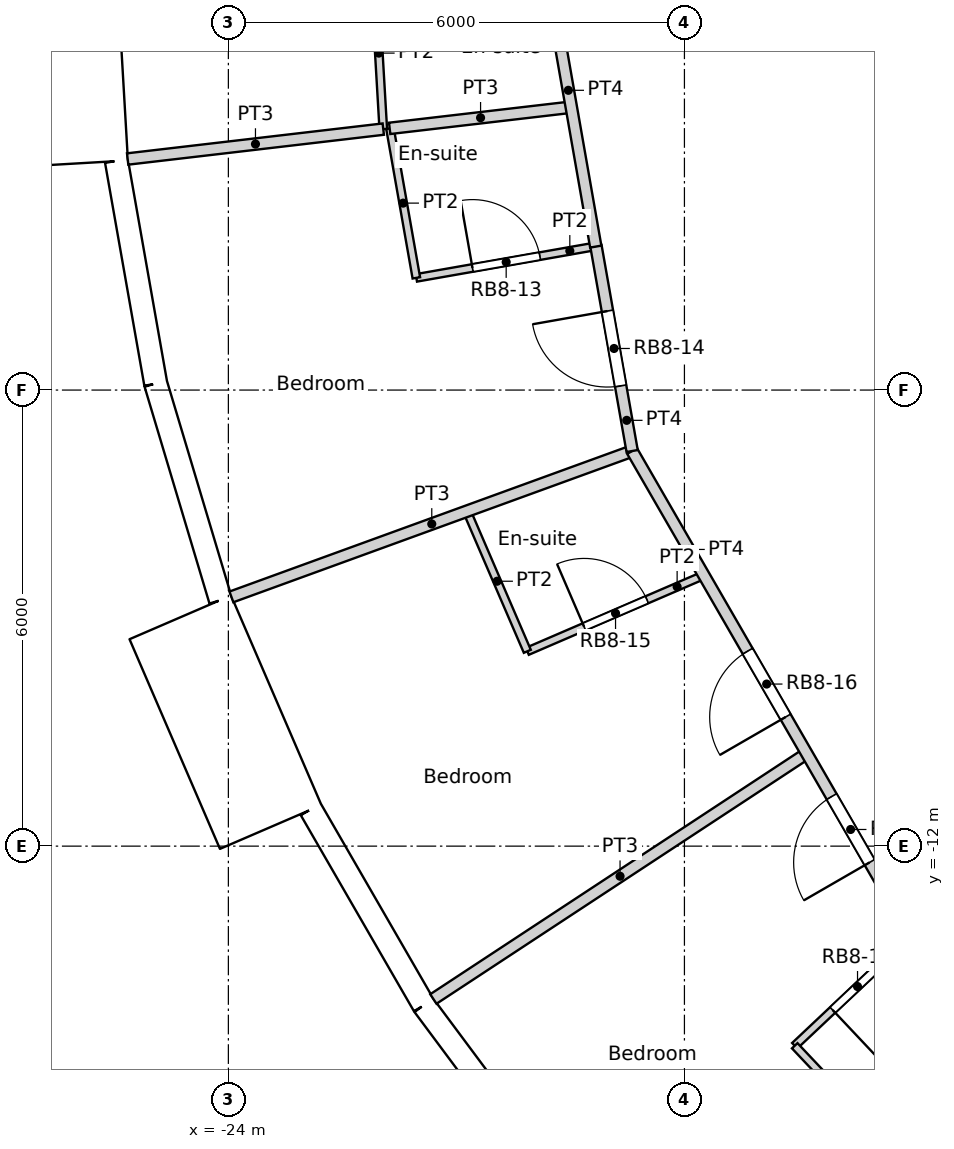
"""IFC4 building model, lengths in metres.
Left out: names, types, materials, properties, quantities, classifications, styles, units other than length and angle.
Written with IfcOpenShell. Run it as: python <this file> out.ifc"""

import sys

from ifc_helpers import new_model, si_unit, direction, frame, frame_2d, origin, origin_2d, place, context, subcontext, project, spatial, rectangle, circle, extrude, element, fill, save


model = new_model("IFC4")
c1 = context("Model", 3, precision=1e-05, world=origin(), true_north=direction((0.0, 1.0)))
c2 = subcontext(c1, "Body", "Model", "MODEL_VIEW")
j1 = project(units=[si_unit("LENGTHUNIT", "METRE"), si_unit("PLANEANGLEUNIT", "RADIAN")], contexts=[c1])
p1 = place(None, origin())
s1 = spatial("IfcSite", under=j1, at=p1, CompositionType="ELEMENT")
p2 = place(p1, origin())
s2 = spatial("IfcBuilding", under=s1, at=p2, CompositionType="ELEMENT")
p3 = place(p2, frame((0.0, 0.0, 201.6)))
s3 = spatial("IfcBuildingStorey", under=s2, at=p3, CompositionType="ELEMENT", Elevation=201.6)
for number, where, z_axis, x_axis in (
    (1, (-24.382, -2.85, 0.0), (0.0, 0.0, 1.0), (1.0, 0.0, 0.0)),
    (2, (-23.067, -8.396, 0.0), (0.0, 0.0, 1.0), (1.0, 0.0, 0.0)),
    (3, (-20.509, -13.489, 0.0), (0.0, 0.0, 1.0), (1.0, 0.0, 0.0)),
):
    element("IfcColumn", number, at=place(p3, frame(where, z_axis=z_axis, x_axis=x_axis)), inside=s3, PredefinedType="COLUMN", context=c2, shape_type="SweptSolid", body=[
        extrude(circle(Radius=0.6, at=origin_2d()), origin(), (0.0, 0.0, 1.0), 3.6),
    ])
for number, where, z_axis, x_axis in (
    (4, (-18.612, -2.805, 0.0), (0.0, 0.0, 1.0), (1.0, 0.0, 0.0)),
    (5, (-16.958, -8.167, 0.0), (0.0, 0.0, 1.0), (1.0, 0.0, 0.0)),
):
    element("IfcColumn", number, at=place(p3, frame(where, z_axis=z_axis, x_axis=x_axis)), inside=s3, PredefinedType="COLUMN", context=c2, shape_type="SweptSolid", body=[
        extrude(circle(Radius=0.65, at=origin_2d()), origin(), (0.0, 0.0, 1.0), 3.6),
    ])
p4 = place(p3, frame((-26.222, -0.025, -0.3), z_axis=(0.0, 0.0, 1.0), x_axis=(0.058106596105, -0.998310384344, 0.0)))
e6 = element("IfcWall", 6, at=p4, inside=s3, PredefinedType="ELEMENTEDWALL", context=c2, shape_type="SweptSolid", body=[
    extrude(rectangle(XDim=3.0, YDim=1.45, at=frame_2d((1.5, 0.0))), origin(), (0.0, 0.0, 1.0), 3.6),
])
p5 = place(p4, frame((1.5, 0.0, 1.85)))
e7 = element("IfcOpeningElement", 7, at=p5, cuts=e6, PredefinedType="OPENING", context=c2, shape_type="SweptSolid", body=[
    extrude(circle(Radius=0.9, at=origin_2d()), frame((0.0, 0.735, 0.0), z_axis=(0.0, -1.0, 0.0), x_axis=(1.0, 0.0, 0.0)), (0.0, 0.0, 1.0), 1.47),
])
p6 = place(p3, frame((-25.472, -2.987, 0.0), z_axis=(0.0, 0.0, 1.0), x_axis=(0.173686952598, -0.984800915159, 0.0)))
e8 = element("IfcWall", 8, at=p6, inside=s3, PredefinedType="SOLIDWALL", context=c2, shape_type="SweptSolid", body=[
    extrude(rectangle(XDim=2.973, YDim=0.3, at=frame_2d((1.486, 0.0))), origin(), (0.0, 0.0, 1.0), 3.3),
])
p7 = place(p6, frame((1.486, 0.0, 1.55)))
e9 = element("IfcOpeningElement", 9, at=p7, cuts=e8, PredefinedType="OPENING", context=c2, shape_type="SweptSolid", body=[
    extrude(circle(Radius=0.9, at=origin_2d()), frame((0.0, 0.16, 0.0), z_axis=(0.0, -1.0, 0.0), x_axis=(1.0, 0.0, 0.0)), (0.0, 0.0, 1.0), 0.32),
])
p8 = place(p3, frame((-24.956, -5.915, 0.0), z_axis=(0.0, 0.0, 1.0), x_axis=(0.286782750849, -0.957995643944, 0.0)))
e10 = element("IfcWall", 10, at=p8, inside=s3, PredefinedType="SOLIDWALL", context=c2, shape_type="SweptSolid", body=[
    extrude(rectangle(XDim=2.973, YDim=0.3, at=frame_2d((1.486, 0.0))), origin(), (0.0, 0.0, 1.0), 3.3),
])
p9 = place(p8, frame((1.486, 0.0, 1.55)))
e11 = element("IfcOpeningElement", 11, at=p9, cuts=e10, PredefinedType="OPENING", context=c2, shape_type="SweptSolid", body=[
    extrude(circle(Radius=0.9, at=origin_2d()), frame((0.0, 0.16, 0.0), z_axis=(0.0, -1.0, 0.0), x_axis=(1.0, 0.0, 0.0)), (0.0, 0.0, 1.0), 0.32),
])
p10 = place(p3, frame((-24.632, -8.992, -0.3), z_axis=(0.0, 0.0, 1.0), x_axis=(0.396079003245, -0.918216435917, 0.0)))
e12 = element("IfcWall", 12, at=p10, inside=s3, PredefinedType="ELEMENTEDWALL", context=c2, shape_type="SweptSolid", body=[
    extrude(rectangle(XDim=3.0, YDim=1.45, at=frame_2d((1.5, 0.0))), origin(), (0.0, 0.0, 1.0), 3.6),
])
p11 = place(p10, frame((1.5, 0.0, 1.85)))
e13 = element("IfcOpeningElement", 13, at=p11, cuts=e12, PredefinedType="OPENING", context=c2, shape_type="SweptSolid", body=[
    extrude(circle(Radius=0.9, at=origin_2d()), frame((0.0, 0.735, 0.0), z_axis=(0.0, -1.0, 0.0), x_axis=(1.0, 0.0, 0.0)), (0.0, 0.0, 1.0), 1.47),
])
p12 = place(p3, frame((-22.915, -11.519, 0.0), z_axis=(0.0, 0.0, 1.0), x_axis=(0.499954672104, -0.866051572276, 0.0)))
e14 = element("IfcWall", 14, at=p12, inside=s3, PredefinedType="SOLIDWALL", context=c2, shape_type="SweptSolid", body=[
    extrude(rectangle(XDim=2.973, YDim=0.3, at=frame_2d((1.486, 0.0))), origin(), (0.0, 0.0, 1.0), 3.3),
])
p13 = place(p12, frame((1.486, 0.0, 1.55)))
e15 = element("IfcOpeningElement", 15, at=p13, cuts=e14, PredefinedType="OPENING", context=c2, shape_type="SweptSolid", body=[
    extrude(circle(Radius=0.9, at=origin_2d()), frame((0.0, 0.16, 0.0), z_axis=(0.0, -1.0, 0.0), x_axis=(1.0, 0.0, 0.0)), (0.0, 0.0, 1.0), 0.32),
])
p14 = place(p3, frame((-21.428, -14.094, 0.0), z_axis=(0.0, 0.0, 1.0), x_axis=(0.597197580538, -0.80209416517, 0.0)))
e16 = element("IfcWall", 16, at=p14, inside=s3, PredefinedType="SOLIDWALL", context=c2, shape_type="SweptSolid", body=[
    extrude(rectangle(XDim=2.973, YDim=0.3, at=frame_2d((1.486, 0.0))), origin(), (0.0, 0.0, 1.0), 3.3),
])
p15 = place(p14, frame((1.486, 0.0, 1.55)))
e17 = element("IfcOpeningElement", 17, at=p15, cuts=e16, PredefinedType="OPENING", context=c2, shape_type="SweptSolid", body=[
    extrude(circle(Radius=0.9, at=origin_2d()), frame((0.0, 0.16, 0.0), z_axis=(0.0, -1.0, 0.0), x_axis=(1.0, 0.0, 0.0)), (0.0, 0.0, 1.0), 0.32),
])
p16 = place(p3, frame((-19.888, 0.0, 0.0), z_axis=(0.0, 0.0, 1.0), x_axis=(0.1727845501, -0.984959643461, 0.0)))
e18 = element("IfcWall", 18, at=p16, inside=s3, PredefinedType="PARTITIONING", context=c2, shape_type="SweptSolid", body=[
    extrude(rectangle(XDim=4.175, YDim=0.15, at=frame_2d((2.088, 0.0))), origin(), (0.0, 0.0, 1.0), 3.3),
])
p17 = place(p3, frame((-19.164, -4.104, 0.0), z_axis=(0.0, 0.0, 1.0), x_axis=(0.173770083029, -0.984786250028, 0.0)))
e19 = element("IfcWall", 19, at=p17, inside=s3, PredefinedType="PARTITIONING", context=c2, shape_type="SweptSolid", body=[
    extrude(rectangle(XDim=2.74, YDim=0.15, at=frame_2d((1.37, 0.0))), origin(), (0.0, 0.0, 1.0), 3.3),
])
p18 = place(p17, frame((0.87, 0.0, 0.0)))
e20 = element("IfcOpeningElement", 20, at=p18, cuts=e19, PredefinedType="OPENING", context=c2, shape_type="SweptSolid", body=[
    extrude(rectangle(XDim=1.0, YDim=2.1, at=frame_2d((0.5, 1.05))), frame((0.0, 0.075, 0.0), z_axis=(0.0, -1.0, 0.0), x_axis=(1.0, 0.0, 0.0)), (0.0, 0.0, 1.0), 0.15),
])
p19 = place(p3, frame((-18.688, -6.802, 0.0), z_axis=(0.0, 0.0, 1.0), x_axis=(0.500009041241, -0.866020183759, 0.0)))
e21 = element("IfcWall", 21, at=p19, inside=s3, PredefinedType="PARTITIONING", context=c2, shape_type="SweptSolid", body=[
    extrude(rectangle(XDim=6.907, YDim=0.15, at=frame_2d((3.454, 0.0))), origin(), (0.0, 0.0, 1.0), 3.3),
])
p20 = place(p19, frame((3.04, 0.0, 0.0)))
e22 = element("IfcOpeningElement", 22, at=p20, cuts=e21, PredefinedType="OPENING", context=c2, shape_type="SweptSolid", body=[
    extrude(rectangle(XDim=1.0, YDim=2.1, at=frame_2d((0.5, 1.05))), frame((0.0, 0.075, 0.0), z_axis=(0.0, -1.0, 0.0), x_axis=(1.0, 0.0, 0.0)), (0.0, 0.0, 1.0), 0.15),
])
p21 = place(p19, frame((5.249, 0.0, 0.0)))
e23 = element("IfcOpeningElement", 23, at=p21, cuts=e21, PredefinedType="OPENING", context=c2, shape_type="SweptSolid", body=[
    extrude(rectangle(XDim=1.0, YDim=2.1, at=frame_2d((0.5, 1.05))), frame((0.0, 0.075, 0.0), z_axis=(0.0, -1.0, 0.0), x_axis=(1.0, 0.0, 0.0)), (0.0, 0.0, 1.0), 0.15),
])
p22 = place(p3, frame((-22.079, -0.567, 0.0), z_axis=(0.0, 0.0, 1.0), x_axis=(0.058493425416, -0.998287793766, 0.0)))
e24 = element("IfcWall", 24, at=p22, inside=s3, PredefinedType="PARTITIONING", context=c2, shape_type="SweptSolid", body=[
    extrude(rectangle(XDim=2.003, YDim=0.1, at=frame_2d((1.002, 0.0))), origin(), (0.0, 0.0, 1.0), 3.3),
])
p23 = place(p3, frame((-25.325, -2.96, 0.0), z_axis=(0.0, 0.0, 1.0), x_axis=(0.993238911344, 0.11608817766, 0.0)))
e25 = element("IfcWall", 25, at=p23, inside=s3, PredefinedType="PARTITIONING", context=c2, shape_type="SweptSolid", body=[
    extrude(rectangle(XDim=3.386, YDim=0.15, at=frame_2d((1.693, 0.0))), origin(), (0.0, 0.0, 1.0), 3.3),
])
p24 = place(p3, frame((-21.878, -2.557, 0.0), z_axis=(0.0, 0.0, 1.0), x_axis=(0.99327460921, 0.115782341913, 0.0)))
e26 = element("IfcWall", 26, at=p24, inside=s3, PredefinedType="PARTITIONING", context=c2, shape_type="SweptSolid", body=[
    extrude(rectangle(XDim=2.408, YDim=0.15, at=frame_2d((1.204, 0.0))), origin(), (0.0, 0.0, 1.0), 3.3),
])
p25 = place(p3, frame((-21.874, -2.557, 0.0), z_axis=(0.0, 0.0, 1.0), x_axis=(0.17368771375, -0.984800780916, 0.0)))
e27 = element("IfcWall", 27, at=p25, inside=s3, PredefinedType="PARTITIONING", context=c2, shape_type="SweptSolid", body=[
    extrude(rectangle(XDim=1.997, YDim=0.1, at=frame_2d((0.999, 0.0))), origin(), (0.0, 0.0, 1.0), 3.3),
])
p26 = place(p3, frame((-21.527, -4.524, 0.0), z_axis=(0.0, 0.0, 1.0), x_axis=(0.9848663854, 0.173315327969, 0.0)))
e28 = element("IfcWall", 28, at=p26, inside=s3, PredefinedType="PARTITIONING", context=c2, shape_type="SweptSolid", body=[
    extrude(rectangle(XDim=2.4, YDim=0.1, at=frame_2d((1.2, 0.0))), origin(), (0.0, 0.0, 1.0), 3.3),
])
p27 = place(p26, frame((0.75, 0.0, 0.0)))
e29 = element("IfcOpeningElement", 29, at=p27, cuts=e28, PredefinedType="OPENING", context=c2, shape_type="SweptSolid", body=[
    extrude(rectangle(XDim=0.9, YDim=2.04, at=frame_2d((0.45, 1.02))), frame((0.0, 0.05, 0.0), z_axis=(0.0, -1.0, 0.0), x_axis=(1.0, 0.0, 0.0)), (0.0, 0.0, 1.0), 0.1),
])
p28 = place(p3, frame((-23.96, -8.721, 0.0), z_axis=(0.0, 0.0, 1.0), x_axis=(0.939700637852, 0.341998115814, 0.0)))
e30 = element("IfcWall", 30, at=p28, inside=s3, PredefinedType="PARTITIONING", context=c2, shape_type="SweptSolid", body=[
    extrude(rectangle(XDim=5.61, YDim=0.15, at=frame_2d((2.805, 0.0))), origin(), (0.0, 0.0, 1.0), 3.3),
])
p29 = place(p3, frame((-20.862, -7.593, 0.0), z_axis=(0.0, 0.0, 1.0), x_axis=(0.395972527348, -0.918262357709, 0.0)))
e31 = element("IfcWall", 31, at=p29, inside=s3, PredefinedType="PARTITIONING", context=c2, shape_type="SweptSolid", body=[
    extrude(rectangle(XDim=2.008, YDim=0.1, at=frame_2d((1.004, 0.0))), origin(), (0.0, 0.0, 1.0), 3.3),
])
p30 = place(p3, frame((-20.067, -9.437, 0.0), z_axis=(0.0, 0.0, 1.0), x_axis=(0.918293825202, 0.395899546091, 0.0)))
e32 = element("IfcWall", 32, at=p30, inside=s3, PredefinedType="PARTITIONING", context=c2, shape_type="SweptSolid", body=[
    extrude(rectangle(XDim=2.528, YDim=0.1, at=frame_2d((1.264, 0.0))), origin(), (0.0, 0.0, 1.0), 3.3),
])
p31 = place(p30, frame((0.814, 0.0, 0.0)))
e33 = element("IfcOpeningElement", 33, at=p31, cuts=e32, PredefinedType="OPENING", context=c2, shape_type="SweptSolid", body=[
    extrude(rectangle(XDim=0.9, YDim=2.04, at=frame_2d((0.45, 1.02))), frame((0.0, 0.05, 0.0), z_axis=(0.0, -1.0, 0.0), x_axis=(1.0, 0.0, 0.0)), (0.0, 0.0, 1.0), 0.1),
])
p32 = place(p3, frame((-21.303, -14.011, 0.0), z_axis=(0.0, 0.0, 1.0), x_axis=(0.835534987945, 0.54943724293, 0.0)))
e34 = element("IfcWall", 34, at=p32, inside=s3, PredefinedType="PARTITIONING", context=c2, shape_type="SweptSolid", body=[
    extrude(rectangle(XDim=5.879, YDim=0.15, at=frame_2d((2.939, 0.0))), origin(), (0.0, 0.0, 1.0), 3.3),
])
p33 = place(p3, frame((-16.549, -14.626, 0.0), z_axis=(0.0, 0.0, 1.0), x_axis=(0.727754926423, 0.68583727448, 0.0)))
e35 = element("IfcWall", 35, at=p33, inside=s3, PredefinedType="PARTITIONING", context=c2, shape_type="SweptSolid", body=[
    extrude(rectangle(XDim=2.271, YDim=0.1, at=frame_2d((1.136, 0.0))), origin(), (0.0, 0.0, 1.0), 3.3),
])
p34 = place(p33, frame((0.686, 0.0, 0.0)))
e36 = element("IfcOpeningElement", 36, at=p34, cuts=e35, PredefinedType="OPENING", context=c2, shape_type="SweptSolid", body=[
    extrude(rectangle(XDim=0.9, YDim=2.04, at=frame_2d((0.45, 1.02))), frame((0.0, 0.05, 0.0), z_axis=(0.0, -1.0, 0.0), x_axis=(1.0, 0.0, 0.0)), (0.0, 0.0, 1.0), 0.1),
])
p35 = place(p3, frame((-16.549, -14.626, 0.0), z_axis=(0.0, 0.0, 1.0), x_axis=(0.686337209023, -0.727283462971, 0.0)))
e37 = element("IfcWall", 37, at=p35, inside=s3, PredefinedType="PARTITIONING", context=c2, shape_type="SweptSolid", body=[
    extrude(rectangle(XDim=2.003, YDim=0.1, at=frame_2d((1.002, 0.0))), origin(), (0.0, 0.0, 1.0), 3.3),
])
p36 = place(p3, frame((-17.497, -18.546, 0.0), z_axis=(0.0, 0.0, 1.0), x_axis=(0.68614289064, 0.727466792111, 0.0)))
e38 = element("IfcWall", 38, at=p36, inside=s3, PredefinedType="PARTITIONING", context=c2, shape_type="SweptSolid", body=[
    extrude(rectangle(XDim=5.878, YDim=0.15, at=frame_2d((2.939, 0.0))), origin(), (0.0, 0.0, 1.0), 3.3),
])
p37 = place(p5, origin())
e39 = element("IfcWindow", 39, at=p37, inside=s3, PartitioningType="SINGLE_PANEL", PredefinedType="WINDOW", context=c2, shape_type="SweptSolid", body=[
    extrude(circle(Radius=0.9, at=origin_2d()), frame((0.0, 0.695, 0.0), z_axis=(0.0, -1.0, 0.0), x_axis=(1.0, 0.0, 0.0)), (0.0, 0.0, 1.0), 0.1),
])
fill(e7, e39)
p38 = place(p7, origin())
e40 = element("IfcWindow", 40, at=p38, inside=s3, PartitioningType="SINGLE_PANEL", PredefinedType="WINDOW", context=c2, shape_type="SweptSolid", body=[
    extrude(circle(Radius=0.9, at=origin_2d()), frame((0.0, 0.12, 0.0), z_axis=(0.0, -1.0, 0.0), x_axis=(1.0, 0.0, 0.0)), (0.0, 0.0, 1.0), 0.1),
])
fill(e9, e40)
p39 = place(p9, origin())
e41 = element("IfcWindow", 41, at=p39, inside=s3, PartitioningType="SINGLE_PANEL", PredefinedType="WINDOW", context=c2, shape_type="SweptSolid", body=[
    extrude(circle(Radius=0.9, at=origin_2d()), frame((0.0, 0.12, 0.0), z_axis=(0.0, -1.0, 0.0), x_axis=(1.0, 0.0, 0.0)), (0.0, 0.0, 1.0), 0.1),
])
fill(e11, e41)
p40 = place(p11, origin())
e42 = element("IfcWindow", 42, at=p40, inside=s3, PartitioningType="SINGLE_PANEL", PredefinedType="WINDOW", context=c2, shape_type="SweptSolid", body=[
    extrude(circle(Radius=0.9, at=origin_2d()), frame((0.0, 0.695, 0.0), z_axis=(0.0, -1.0, 0.0), x_axis=(1.0, 0.0, 0.0)), (0.0, 0.0, 1.0), 0.1),
])
fill(e13, e42)
p41 = place(p13, origin())
e43 = element("IfcWindow", 43, at=p41, inside=s3, PartitioningType="SINGLE_PANEL", PredefinedType="WINDOW", context=c2, shape_type="SweptSolid", body=[
    extrude(circle(Radius=0.9, at=origin_2d()), frame((0.0, 0.12, 0.0), z_axis=(0.0, -1.0, 0.0), x_axis=(1.0, 0.0, 0.0)), (0.0, 0.0, 1.0), 0.1),
])
fill(e15, e43)
p42 = place(p15, origin())
e44 = element("IfcWindow", 44, at=p42, inside=s3, PartitioningType="SINGLE_PANEL", PredefinedType="WINDOW", context=c2, shape_type="SweptSolid", body=[
    extrude(circle(Radius=0.9, at=origin_2d()), frame((0.0, 0.12, 0.0), z_axis=(0.0, -1.0, 0.0), x_axis=(1.0, 0.0, 0.0)), (0.0, 0.0, 1.0), 0.1),
])
fill(e17, e44)
p43 = place(p27, origin())
e45 = element("IfcDoor", 45, at=p43, inside=s3, OperationType="SINGLE_SWING_LEFT", PredefinedType="DOOR", context=c2, shape_type="SweptSolid", body=[
    extrude(rectangle(XDim=0.9, YDim=2.04, at=frame_2d((0.45, 1.02))), frame((0.0, 0.025, 0.0), z_axis=(0.0, -1.0, 0.0), x_axis=(1.0, 0.0, 0.0)), (0.0, 0.0, 1.0), 0.05),
])
fill(e29, e45)
p44 = place(p18, origin())
e46 = element("IfcDoor", 46, at=p44, inside=s3, OperationType="SINGLE_SWING_RIGHT", PredefinedType="DOOR", context=c2, shape_type="SweptSolid", body=[
    extrude(rectangle(XDim=1.0, YDim=2.1, at=frame_2d((0.5, 1.05))), frame((0.0, 0.025, 0.0), z_axis=(0.0, -1.0, 0.0), x_axis=(1.0, 0.0, 0.0)), (0.0, 0.0, 1.0), 0.05),
])
fill(e20, e46)
p45 = place(p31, origin())
e47 = element("IfcDoor", 47, at=p45, inside=s3, OperationType="SINGLE_SWING_LEFT", PredefinedType="DOOR", context=c2, shape_type="SweptSolid", body=[
    extrude(rectangle(XDim=0.9, YDim=2.04, at=frame_2d((0.45, 1.02))), frame((0.0, 0.025, 0.0), z_axis=(0.0, -1.0, 0.0), x_axis=(1.0, 0.0, 0.0)), (0.0, 0.0, 1.0), 0.05),
])
fill(e33, e47)
p46 = place(p20, origin())
e48 = element("IfcDoor", 48, at=p46, inside=s3, OperationType="SINGLE_SWING_LEFT", PredefinedType="DOOR", context=c2, shape_type="SweptSolid", body=[
    extrude(rectangle(XDim=1.0, YDim=2.1, at=frame_2d((0.5, 1.05))), frame((0.0, 0.025, 0.0), z_axis=(0.0, -1.0, 0.0), x_axis=(1.0, 0.0, 0.0)), (0.0, 0.0, 1.0), 0.05),
])
fill(e22, e48)
p47 = place(p34, origin())
e49 = element("IfcDoor", 49, at=p47, inside=s3, OperationType="SINGLE_SWING_RIGHT", PredefinedType="DOOR", context=c2, shape_type="SweptSolid", body=[
    extrude(rectangle(XDim=0.9, YDim=2.04, at=frame_2d((0.45, 1.02))), frame((0.0, 0.025, 0.0), z_axis=(0.0, -1.0, 0.0), x_axis=(1.0, 0.0, 0.0)), (0.0, 0.0, 1.0), 0.05),
])
fill(e36, e49)
p48 = place(p21, origin())
e50 = element("IfcDoor", 50, at=p48, inside=s3, OperationType="SINGLE_SWING_LEFT", PredefinedType="DOOR", context=c2, shape_type="SweptSolid", body=[
    extrude(rectangle(XDim=1.0, YDim=2.1, at=frame_2d((0.5, 1.05))), frame((0.0, 0.025, 0.0), z_axis=(0.0, -1.0, 0.0), x_axis=(1.0, 0.0, 0.0)), (0.0, 0.0, 1.0), 0.05),
])
fill(e23, e50)
save(model, sys.argv[1])
